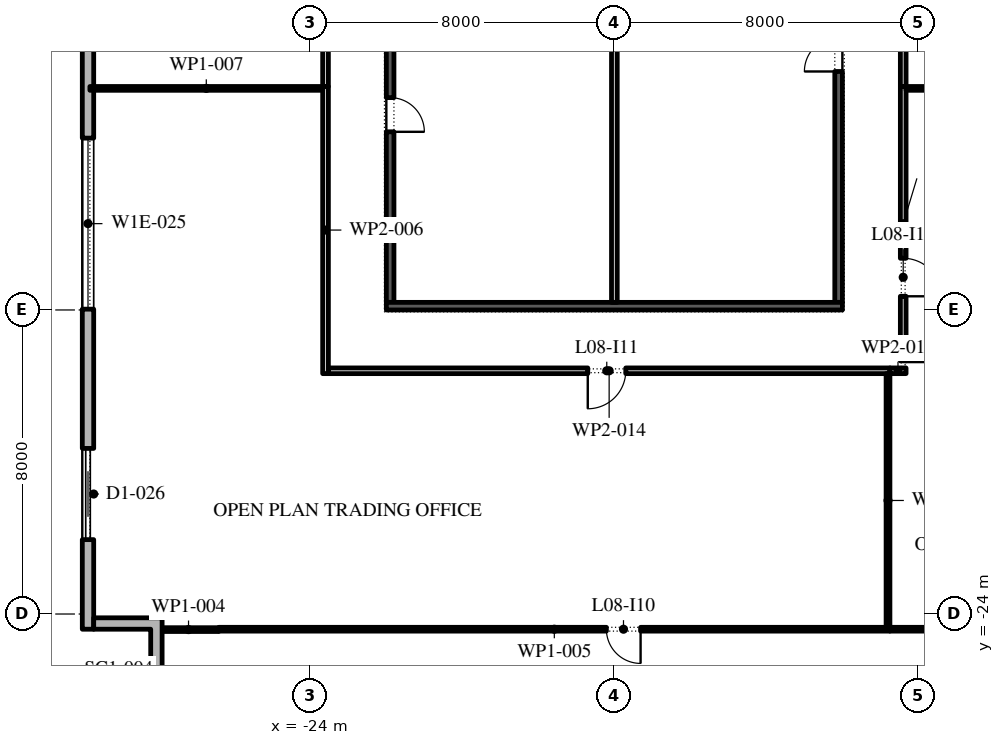
"""IFC4 building model, lengths in metres.
Left out: names, types, materials, properties, quantities, classifications, styles, units other than length and angle.
Written with IfcOpenShell. Run it as: python <this file> out.ifc"""

import sys

from ifc_helpers import new_model, si_unit, direction, frame, frame_2d, origin, place, context, subcontext, project, spatial, polyline, rectangle, outline, extrude, element, fill, save


model = new_model("IFC4")
c1 = context("Model", 3, precision=1e-05, world=origin(), true_north=direction((0.0, 1.0)))
c2 = subcontext(c1, "Body", "Model", "MODEL_VIEW")
j1 = project(units=[si_unit("LENGTHUNIT", "METRE"), si_unit("PLANEANGLEUNIT", "RADIAN")], contexts=[c1])
p1 = place(None, origin())
s1 = spatial("IfcSite", under=j1, at=p1, CompositionType="ELEMENT")
p2 = place(p1, origin())
s2 = spatial("IfcBuilding", under=s1, at=p2, CompositionType="ELEMENT")
p3 = place(p2, frame((0.0, 0.0, 43.8)))
s3 = spatial("IfcBuildingStorey", under=s2, at=p3, CompositionType="ELEMENT", Elevation=43.8)
p4 = place(p3, frame((-29.85, 25.1, 0.0), z_axis=(0.0, 0.0, 1.0), x_axis=(0.0, -1.0, 0.0)))
e1 = element("IfcWall", 1, at=p4, inside=s3, PredefinedType="STANDARD", context=c2, shape_type="SweptSolid", body=[
    extrude(rectangle(XDim=49.5, YDim=0.3, at=frame_2d((24.75, 0.0))), origin(), (0.0, 0.0, 1.0), 4.0),
])
p5 = place(p4, frame((1.157, 0.0, 0.45)))
e2 = element("IfcOpeningElement", 2, at=p5, cuts=e1, PredefinedType="OPENING", context=c2, shape_type="SweptSolid", body=[
    extrude(rectangle(XDim=4.5, YDim=2.875, at=frame_2d((2.25, 1.438))), frame((0.0, 0.16, 0.0), z_axis=(0.0, -1.0, 0.0), x_axis=(1.0, 0.0, 0.0)), (0.0, 0.0, 1.0), 0.32),
])
p6 = place(p4, frame((8.121, 0.0, 0.45)))
e3 = element("IfcOpeningElement", 3, at=p6, cuts=e1, PredefinedType="OPENING", context=c2, shape_type="SweptSolid", body=[
    extrude(rectangle(XDim=4.5, YDim=3.05, at=frame_2d((2.25, 1.525))), frame((0.0, 0.16, 0.0), z_axis=(0.0, -1.0, 0.0), x_axis=(1.0, 0.0, 0.0)), (0.0, 0.0, 1.0), 0.32),
])
p7 = place(p4, frame((16.286, 0.0, 0.0)))
e4 = element("IfcOpeningElement", 4, at=p7, cuts=e1, PredefinedType="OPENING", context=c2, shape_type="SweptSolid", body=[
    extrude(rectangle(XDim=2.4, YDim=3.325, at=frame_2d((1.2, 1.663))), frame((0.0, 0.16, 0.0), z_axis=(0.0, -1.0, 0.0), x_axis=(1.0, 0.0, 0.0)), (0.0, 0.0, 1.0), 0.32),
])
p8 = place(p4, frame((22.35, 0.0, 0.45)))
e5 = element("IfcOpeningElement", 5, at=p8, cuts=e1, PredefinedType="OPENING", context=c2, shape_type="SweptSolid", body=[
    extrude(rectangle(XDim=4.5, YDim=2.875, at=frame_2d((2.25, 1.438))), frame((0.0, 0.16, 0.0), z_axis=(0.0, -1.0, 0.0), x_axis=(1.0, 0.0, 0.0)), (0.0, 0.0, 1.0), 0.32),
])
p9 = place(p4, frame((29.464, 0.0, 0.45)))
e6 = element("IfcOpeningElement", 6, at=p9, cuts=e1, PredefinedType="OPENING", context=c2, shape_type="SweptSolid", body=[
    extrude(rectangle(XDim=4.5, YDim=2.875, at=frame_2d((2.25, 1.438))), frame((0.0, 0.16, 0.0), z_axis=(0.0, -1.0, 0.0), x_axis=(1.0, 0.0, 0.0)), (0.0, 0.0, 1.0), 0.32),
])
p10 = place(p4, frame((36.579, 0.0, 0.45)))
e7 = element("IfcOpeningElement", 7, at=p10, cuts=e1, PredefinedType="OPENING", context=c2, shape_type="SweptSolid", body=[
    extrude(rectangle(XDim=4.5, YDim=2.825, at=frame_2d((2.25, 1.413))), frame((0.0, 0.16, 0.0), z_axis=(0.0, -1.0, 0.0), x_axis=(1.0, 0.0, 0.0)), (0.0, 0.0, 1.0), 0.32),
])
p11 = place(p4, frame((44.743, 0.0, 0.0)))
e8 = element("IfcOpeningElement", 8, at=p11, cuts=e1, PredefinedType="OPENING", context=c2, shape_type="SweptSolid", body=[
    extrude(rectangle(XDim=2.4, YDim=3.5, at=frame_2d((1.2, 1.75))), frame((0.0, 0.16, 0.0), z_axis=(0.0, -1.0, 0.0), x_axis=(1.0, 0.0, 0.0)), (0.0, 0.0, 1.0), 0.32),
])
p12 = place(p3, origin())
e9 = element("IfcWall", 9, at=p12, inside=s3, PredefinedType="STANDARD", context=c2, shape_type="SweptSolid", body=[
    extrude(outline(polyline([(-26.4, -26.2), (-28.2, -26.2), (-28.2, -24.4), (-29.7, -24.4), (-29.7, -24.1), (-27.9, -24.1), (-27.9, -25.9), (-26.1, -25.9), (-26.1, -28.0), (-26.4, -28.0), (-26.4, -26.2)])), origin(), (0.0, 0.0, 1.0), 4.0),
])
p13 = place(p3, frame((-21.9, -15.8, 0.0), z_axis=(0.0, 0.0, 1.0), x_axis=(0.0, 1.0, 0.0)))
e10 = element("IfcWall", 10, at=p13, inside=s3, PredefinedType="SHEAR", context=c2, shape_type="SweptSolid", body=[
    extrude(rectangle(XDim=13.05, YDim=0.2, at=frame_2d((6.525, 0.0))), origin(), (0.0, 0.0, 1.0), 4.0),
])
p14 = place(p13, frame((4.488, 0.0, 0.0)))
e11 = element("IfcOpeningElement", 11, at=p14, cuts=e10, PredefinedType="OPENING", context=c2, shape_type="SweptSolid", body=[
    extrude(rectangle(XDim=0.9, YDim=2.1, at=frame_2d((0.45, 1.05))), frame((0.0, 0.11, 0.0), z_axis=(0.0, -1.0, 0.0), x_axis=(1.0, 0.0, 0.0)), (0.0, 0.0, 1.0), 0.22),
])
p15 = place(p13, frame((11.038, 0.0, 0.0)))
e12 = element("IfcOpeningElement", 12, at=p15, cuts=e10, PredefinedType="OPENING", context=c2, shape_type="SweptSolid", body=[
    extrude(rectangle(XDim=1.0, YDim=2.1, at=frame_2d((0.5, 1.05))), frame((0.0, 0.11, 0.0), z_axis=(0.0, -1.0, 0.0), x_axis=(1.0, 0.0, 0.0)), (0.0, 0.0, 1.0), 0.22),
])
p16 = place(p3, frame((-10.1, -15.8, 0.0), z_axis=(0.0, 0.0, 1.0), x_axis=(0.0, 1.0, 0.0)))
e13 = element("IfcWall", 13, at=p16, inside=s3, PredefinedType="SHEAR", context=c2, shape_type="SweptSolid", body=[
    extrude(rectangle(XDim=13.05, YDim=0.2, at=frame_2d((6.525, 0.0))), origin(), (0.0, 0.0, 1.0), 4.0),
])
p17 = place(p16, frame((6.075, 0.0, 0.0)))
e14 = element("IfcOpeningElement", 14, at=p17, cuts=e13, PredefinedType="OPENING", context=c2, shape_type="SweptSolid", body=[
    extrude(rectangle(XDim=0.9, YDim=2.1, at=frame_2d((0.45, 1.05))), frame((0.0, 0.11, 0.0), z_axis=(0.0, -1.0, 0.0), x_axis=(1.0, 0.0, 0.0)), (0.0, 0.0, 1.0), 0.22),
])
p18 = place(p3, frame((-22.0, -15.9, 0.0), z_axis=(0.0, 0.0, 1.0), x_axis=(1.0, 0.0, 0.0)))
e15 = element("IfcWall", 15, at=p18, inside=s3, PredefinedType="SHEAR", context=c2, shape_type="SweptSolid", body=[
    extrude(rectangle(XDim=12.0, YDim=0.2, at=frame_2d((6.0, 0.0))), origin(), (0.0, 0.0, 1.0), 4.0),
])
p19 = place(p3, frame((-16.0, -15.8, 0.0), z_axis=(0.0, 0.0, 1.0), x_axis=(0.0, 1.0, 0.0)))
e16 = element("IfcWall", 16, at=p19, inside=s3, PredefinedType="PARTITIONING", context=c2, shape_type="SweptSolid", body=[
    extrude(rectangle(XDim=13.05, YDim=0.15, at=frame_2d((6.525, 0.0))), origin(), (0.0, 0.0, 1.0), 4.0),
])
p20 = place(p19, frame((11.087, 0.0, 0.0)))
e17 = element("IfcOpeningElement", 17, at=p20, cuts=e16, PredefinedType="OPENING", context=c2, shape_type="SweptSolid", body=[
    extrude(rectangle(XDim=0.9, YDim=2.1, at=frame_2d((0.45, 1.05))), frame((0.0, 0.085, 0.0), z_axis=(0.0, -1.0, 0.0), x_axis=(1.0, 0.0, 0.0)), (0.0, 0.0, 1.0), 0.17),
])
p21 = place(p3, frame((-28.0, -24.41, 0.0), z_axis=(0.0, 0.0, 1.0), x_axis=(1.0, 0.0, 0.0)))
e18 = element("IfcWall", 18, at=p21, inside=s3, PredefinedType="PARTITIONING", context=c2, shape_type="SweptSolid", body=[
    extrude(rectangle(XDim=1.59, YDim=0.1, at=frame_2d((0.795, 0.0))), origin(), (0.0, 0.0, 1.0), 4.0),
])
p22 = place(p3, frame((-26.41, -24.4, 0.0), z_axis=(0.0, 0.0, 1.0), x_axis=(1.0, 0.0, 0.0)))
e19 = element("IfcWall", 19, at=p22, inside=s3, PredefinedType="PARTITIONING", context=c2, shape_type="SweptSolid", body=[
    extrude(rectangle(XDim=17.66, YDim=0.1, at=frame_2d((8.83, 0.0))), origin(), (0.0, 0.0, 1.0), 4.0),
])
p23 = place(p22, frame((10.2, 0.0, 0.0)))
e20 = element("IfcOpeningElement", 20, at=p23, cuts=e19, PredefinedType="OPENING", context=c2, shape_type="SweptSolid", body=[
    extrude(rectangle(XDim=0.9, YDim=2.1, at=frame_2d((0.45, 1.05))), frame((0.0, 0.06, 0.0), z_axis=(0.0, -1.0, 0.0), x_axis=(1.0, 0.0, 0.0)), (0.0, 0.0, 1.0), 0.12),
])
p24 = place(p3, frame((-23.6, -17.675, 0.0), z_axis=(0.0, 0.0, 1.0), x_axis=(0.0, 1.0, 0.0)))
e21 = element("IfcWall", 21, at=p24, inside=s3, PredefinedType="PARTITIONING", context=c2, shape_type="SweptSolid", body=[
    extrude(rectangle(XDim=7.555, YDim=0.15, at=frame_2d((3.777, 0.0))), origin(), (0.0, 0.0, 1.0), 4.0),
])
p25 = place(p3, frame((-23.675, -10.17, 0.0), z_axis=(0.0, 0.0, 1.0), x_axis=(-1.0, 0.0, 0.0)))
e22 = element("IfcWall", 22, at=p25, inside=s3, PredefinedType="PARTITIONING", context=c2, shape_type="SweptSolid", body=[
    extrude(rectangle(XDim=6.125, YDim=0.1, at=frame_2d((3.062, 0.0))), origin(), (0.0, 0.0, 1.0), 4.0),
])
p26 = place(p3, frame((-23.6, -10.12, 0.0), z_axis=(0.0, 0.0, 1.0), x_axis=(0.0, 1.0, 0.0)))
e23 = element("IfcWall", 23, at=p26, inside=s3, PredefinedType="PARTITIONING", context=c2, shape_type="SweptSolid", body=[
    extrude(rectangle(XDim=7.01, YDim=0.15, at=frame_2d((3.505, 0.0))), origin(), (0.0, 0.0, 1.0), 4.0),
])
p27 = place(p26, frame((2.41, 0.0, 0.0)))
e24 = element("IfcOpeningElement", 24, at=p27, cuts=e23, PredefinedType="OPENING", context=c2, shape_type="SweptSolid", body=[
    extrude(rectangle(XDim=1.0, YDim=2.1, at=frame_2d((0.5, 1.05))), frame((0.0, 0.085, 0.0), z_axis=(0.0, -1.0, 0.0), x_axis=(1.0, 0.0, 0.0)), (0.0, 0.0, 1.0), 0.17),
])
p28 = place(p3, frame((-8.75, -24.4, 0.0), z_axis=(0.0, 0.0, 1.0), x_axis=(1.0, 0.0, 0.0)))
e25 = element("IfcWall", 25, at=p28, inside=s3, PredefinedType="PARTITIONING", context=c2, shape_type="SweptSolid", body=[
    extrude(rectangle(XDim=10.2, YDim=0.1, at=frame_2d((5.1, 0.0))), origin(), (0.0, 0.0, 1.0), 4.0),
])
p29 = place(p3, frame((-8.75, -17.6, 0.0), z_axis=(0.0, 0.0, 1.0), x_axis=(-1.0, 0.0, 0.0)))
e26 = element("IfcWall", 26, at=p29, inside=s3, PredefinedType="PARTITIONING", context=c2, shape_type="SweptSolid", body=[
    extrude(rectangle(XDim=14.775, YDim=0.15, at=frame_2d((7.387, 0.0))), origin(), (0.0, 0.0, 1.0), 4.0),
])
p30 = place(p29, frame((6.95, 0.0, 0.0)))
e27 = element("IfcOpeningElement", 27, at=p30, cuts=e26, PredefinedType="OPENING", context=c2, shape_type="SweptSolid", body=[
    extrude(rectangle(XDim=1.0, YDim=2.1, at=frame_2d((0.5, 1.05))), frame((0.0, 0.085, 0.0), z_axis=(0.0, -1.0, 0.0), x_axis=(1.0, 0.0, 0.0)), (0.0, 0.0, 1.0), 0.17),
])
p31 = place(p3, frame((-8.8, -17.675, 0.0), z_axis=(0.0, 0.0, 1.0), x_axis=(0.0, -1.0, 0.0)))
e28 = element("IfcWall", 28, at=p31, inside=s3, PredefinedType="PARTITIONING", context=c2, shape_type="SweptSolid", body=[
    extrude(rectangle(XDim=6.675, YDim=0.1, at=frame_2d((3.337, 0.0))), origin(), (0.0, 0.0, 1.0), 4.0),
])
p32 = place(p3, frame((-8.325, -17.6, 0.0), z_axis=(0.0, 0.0, 1.0), x_axis=(-1.0, 0.0, 0.0)))
e29 = element("IfcWall", 29, at=p32, inside=s3, PredefinedType="PARTITIONING", context=c2, shape_type="SweptSolid", body=[
    extrude(rectangle(XDim=0.425, YDim=0.15, at=frame_2d((0.212, 0.0))), origin(), (0.0, 0.0, 1.0), 4.0),
])
p33 = place(p3, frame((-8.4, -10.12, 0.0), z_axis=(0.0, 0.0, 1.0), x_axis=(0.0, -1.0, 0.0)))
e30 = element("IfcWall", 30, at=p33, inside=s3, PredefinedType="PARTITIONING", context=c2, shape_type="SweptSolid", body=[
    extrude(rectangle(XDim=7.22, YDim=0.15, at=frame_2d((3.61, 0.0))), origin(), (0.0, 0.0, 1.0), 4.0),
])
p34 = place(p33, frame((4.52, 0.0, 0.0)))
e31 = element("IfcOpeningElement", 31, at=p34, cuts=e30, PredefinedType="OPENING", context=c2, shape_type="SweptSolid", body=[
    extrude(rectangle(XDim=1.0, YDim=2.1, at=frame_2d((0.5, 1.05))), frame((0.0, 0.085, 0.0), z_axis=(0.0, -1.0, 0.0), x_axis=(1.0, 0.0, 0.0)), (0.0, 0.0, 1.0), 0.17),
])
p35 = place(p3, frame((-8.4, -4.925, 0.0), z_axis=(0.0, 0.0, 1.0), x_axis=(0.0, -1.0, 0.0)))
e32 = element("IfcWall", 32, at=p35, inside=s3, PredefinedType="PARTITIONING", context=c2, shape_type="SweptSolid", body=[
    extrude(rectangle(XDim=5.195, YDim=0.15, at=frame_2d((2.598, 0.0))), origin(), (0.0, 0.0, 1.0), 4.0),
])
p36 = place(p3, frame((1.55, -17.29, 0.0), z_axis=(0.0, 0.0, 1.0), x_axis=(-1.0, 0.0, 0.0)))
e33 = element("IfcWall", 33, at=p36, inside=s3, PredefinedType="PARTITIONING", context=c2, shape_type="SweptSolid", body=[
    extrude(rectangle(XDim=9.875, YDim=0.1, at=frame_2d((4.938, 0.0))), origin(), (0.0, 0.0, 1.0), 4.0),
])
p37 = place(p36, frame((5.6, 0.0, 0.0)))
e34 = element("IfcOpeningElement", 34, at=p37, cuts=e33, PredefinedType="OPENING", context=c2, shape_type="SweptSolid", body=[
    extrude(rectangle(XDim=0.9, YDim=2.1, at=frame_2d((0.45, 1.05))), frame((0.0, 0.06, 0.0), z_axis=(0.0, -1.0, 0.0), x_axis=(1.0, 0.0, 0.0)), (0.0, 0.0, 1.0), 0.12),
])
p38 = place(p3, frame((8.325, -10.17, 0.0), z_axis=(0.0, 0.0, 1.0), x_axis=(-1.0, 0.0, 0.0)))
e35 = element("IfcWall", 35, at=p38, inside=s3, PredefinedType="PARTITIONING", context=c2, shape_type="SweptSolid", body=[
    extrude(rectangle(XDim=16.65, YDim=0.1, at=frame_2d((8.325, 0.0))), origin(), (0.0, 0.0, 1.0), 4.0),
])
p39 = place(p10, origin())
e36 = element("IfcWindow", 36, at=p39, inside=s3, PartitioningType="DOUBLE_PANEL_VERTICAL", PredefinedType="WINDOW", context=c2, shape_type="SweptSolid", body=[
    extrude(rectangle(XDim=4.5, YDim=2.825, at=frame_2d((2.25, 1.413))), frame((0.0, 0.03, 0.0), z_axis=(0.0, -1.0, 0.0), x_axis=(1.0, 0.0, 0.0)), (0.0, 0.0, 1.0), 0.06),
])
fill(e7, e36)
p40 = place(p11, origin())
e37 = element("IfcDoor", 37, at=p40, inside=s3, OperationType="DOUBLE_DOOR_SLIDING", PredefinedType="DOOR", context=c2, shape_type="SweptSolid", body=[
    extrude(rectangle(XDim=2.4, YDim=3.5, at=frame_2d((1.2, 1.75))), frame((0.0, 0.025, 0.0), z_axis=(0.0, -1.0, 0.0), x_axis=(1.0, 0.0, 0.0)), (0.0, 0.0, 1.0), 0.05),
])
fill(e8, e37)
p41 = place(p14, frame((0.9, -0.15, 0.0), z_axis=(0.0, 0.0, 1.0), x_axis=(-1.0, 0.0, 0.0)))
e38 = element("IfcDoor", 38, at=p41, inside=s3, OperationType="SINGLE_SWING_LEFT", PredefinedType="DOOR", context=c2, shape_type="SweptSolid", body=[
    extrude(rectangle(XDim=0.9, YDim=2.1, at=frame_2d((0.45, 1.05))), frame((0.0, -0.05, 0.0), z_axis=(0.0, -1.0, 0.0), x_axis=(1.0, 0.0, 0.0)), (0.0, 0.0, 1.0), 0.05),
])
fill(e11, e38)
p42 = place(p17, origin())
e39 = element("IfcDoor", 39, at=p42, inside=s3, OperationType="SINGLE_SWING_RIGHT", PredefinedType="DOOR", context=c2, shape_type="SweptSolid", body=[
    extrude(rectangle(XDim=0.9, YDim=2.1, at=frame_2d((0.45, 1.05))), frame((0.0, 0.1, 0.0), z_axis=(0.0, -1.0, 0.0), x_axis=(1.0, 0.0, 0.0)), (0.0, 0.0, 1.0), 0.05),
])
fill(e14, e39)
p43 = place(p23, frame((0.9, 0.0, 0.0), z_axis=(0.0, 0.0, 1.0), x_axis=(-1.0, 0.0, 0.0)))
e40 = element("IfcDoor", 40, at=p43, inside=s3, OperationType="SINGLE_SWING_RIGHT", PredefinedType="DOOR", context=c2, shape_type="SweptSolid", body=[
    extrude(rectangle(XDim=0.9, YDim=2.1, at=frame_2d((0.45, 1.05))), frame((0.0, 0.025, 0.0), z_axis=(0.0, -1.0, 0.0), x_axis=(1.0, 0.0, 0.0)), (0.0, 0.0, 1.0), 0.05),
])
fill(e20, e40)
p44 = place(p30, origin())
e41 = element("IfcDoor", 41, at=p44, inside=s3, OperationType="SINGLE_SWING_LEFT", PredefinedType="DOOR", context=c2, shape_type="SweptSolid", body=[
    extrude(rectangle(XDim=1.0, YDim=2.1, at=frame_2d((0.5, 1.05))), frame((0.0, 0.025, 0.0), z_axis=(0.0, -1.0, 0.0), x_axis=(1.0, 0.0, 0.0)), (0.0, 0.0, 1.0), 0.05),
])
fill(e27, e41)
p45 = place(p34, origin())
e42 = element("IfcDoor", 42, at=p45, inside=s3, OperationType="SINGLE_SWING_LEFT", PredefinedType="DOOR", context=c2, shape_type="SweptSolid", body=[
    extrude(rectangle(XDim=1.0, YDim=2.1, at=frame_2d((0.5, 1.05))), frame((0.0, 0.025, 0.0), z_axis=(0.0, -1.0, 0.0), x_axis=(1.0, 0.0, 0.0)), (0.0, 0.0, 1.0), 0.05),
])
fill(e31, e42)
save(model, sys.argv[1])
